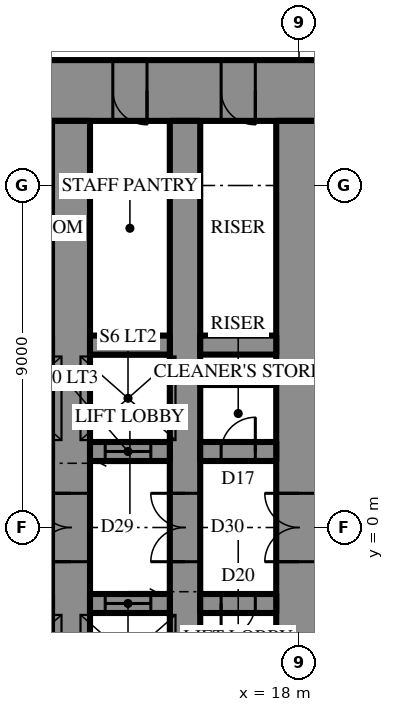
"""IFC4 building model, lengths in metres.
Left out: names, types, materials, properties, quantities, classifications, styles, units other than length and angle.
Written with IfcOpenShell. Run it as: python <this file> out.ifc"""

import sys

from ifc_helpers import new_model, si_unit, direction, frame, frame_2d, origin, place, context, subcontext, project, spatial, rectangle, extrude, element, fill, save


model = new_model("IFC4")
c1 = context("Model", 3, precision=1e-05, world=origin(), true_north=direction((0.0, 1.0)))
c2 = subcontext(c1, "Body", "Model", "MODEL_VIEW")
j1 = project(units=[si_unit("LENGTHUNIT", "METRE"), si_unit("PLANEANGLEUNIT", "RADIAN")], contexts=[c1])
p1 = place(None, origin())
s1 = spatial("IfcSite", under=j1, at=p1, CompositionType="ELEMENT")
p2 = place(p1, origin())
s2 = spatial("IfcBuilding", under=s1, at=p2, CompositionType="ELEMENT")
p3 = place(p2, frame((0.0, 0.0, 210.5)))
s3 = spatial("IfcBuildingStorey", under=s2, at=p3, CompositionType="ELEMENT", Elevation=210.5)
p4 = place(p3, frame((-18.6, 11.5, 0.0), z_axis=(0.0, 0.0, 1.0), x_axis=(1.0, 0.0, 0.0)))
e1 = element("IfcWall", 1, at=p4, inside=s3, PredefinedType="SHEAR", context=c2, shape_type="SweptSolid", body=[
    extrude(rectangle(XDim=37.2, YDim=1.6, at=frame_2d((18.6, 0.0))), origin(), (0.0, 0.0, 1.0), 5.0),
])
p5 = place(p4, frame((19.45, 0.0, 0.0)))
e2 = element("IfcOpeningElement", 2, at=p5, cuts=e1, PredefinedType="OPENING", context=c2, shape_type="SweptSolid", body=[
    extrude(rectangle(XDim=0.9, YDim=2.2, at=frame_2d((0.45, 1.1))), frame((0.0, 0.81, 0.0), z_axis=(0.0, -1.0, 0.0), x_axis=(1.0, 0.0, 0.0)), (0.0, 0.0, 1.0), 1.62),
])
p6 = place(p4, frame((22.45, 0.0, 0.0)))
e3 = element("IfcOpeningElement", 3, at=p6, cuts=e1, PredefinedType="OPENING", context=c2, shape_type="SweptSolid", body=[
    extrude(rectangle(XDim=0.9, YDim=2.2, at=frame_2d((0.45, 1.1))), frame((0.0, 0.81, 0.0), z_axis=(0.0, -1.0, 0.0), x_axis=(1.0, 0.0, 0.0)), (0.0, 0.0, 1.0), 1.62),
])
p7 = place(p4, frame((25.5, 0.0, 0.0)))
e4 = element("IfcOpeningElement", 4, at=p7, cuts=e1, PredefinedType="OPENING", context=c2, shape_type="SweptSolid", body=[
    extrude(rectangle(XDim=1.0, YDim=2.2, at=frame_2d((0.5, 1.1))), frame((0.0, 0.81, 0.0), z_axis=(0.0, -1.0, 0.0), x_axis=(1.0, 0.0, 0.0)), (0.0, 0.0, 1.0), 1.62),
])
p8 = place(p4, frame((1.75, 0.0, 0.0)))
e5 = element("IfcOpeningElement", 5, at=p8, cuts=e1, PredefinedType="OPENING", context=c2, shape_type="SweptSolid", body=[
    extrude(rectangle(XDim=0.9, YDim=2.2, at=frame_2d((0.45, 1.1))), frame((0.0, 0.81, 0.0), z_axis=(0.0, -1.0, 0.0), x_axis=(1.0, 0.0, 0.0)), (0.0, 0.0, 1.0), 1.62),
])
p9 = place(p4, frame((4.6, 0.0, 0.0)))
e6 = element("IfcOpeningElement", 6, at=p9, cuts=e1, PredefinedType="OPENING", context=c2, shape_type="SweptSolid", body=[
    extrude(rectangle(XDim=0.9, YDim=2.2, at=frame_2d((0.45, 1.1))), frame((0.0, 0.81, 0.0), z_axis=(0.0, -1.0, 0.0), x_axis=(1.0, 0.0, 0.0)), (0.0, 0.0, 1.0), 1.62),
])
p10 = place(p4, frame((7.85, 0.0, 0.0)))
e7 = element("IfcOpeningElement", 7, at=p10, cuts=e1, PredefinedType="OPENING", context=c2, shape_type="SweptSolid", body=[
    extrude(rectangle(XDim=0.9, YDim=2.2, at=frame_2d((0.45, 1.1))), frame((0.0, 0.81, 0.0), z_axis=(0.0, -1.0, 0.0), x_axis=(1.0, 0.0, 0.0)), (0.0, 0.0, 1.0), 1.62),
])
p11 = place(p4, frame((28.45, 0.0, 0.0)))
e8 = element("IfcOpeningElement", 8, at=p11, cuts=e1, PredefinedType="OPENING", context=c2, shape_type="SweptSolid", body=[
    extrude(rectangle(XDim=0.9, YDim=2.2, at=frame_2d((0.45, 1.1))), frame((0.0, 0.81, 0.0), z_axis=(0.0, -1.0, 0.0), x_axis=(1.0, 0.0, 0.0)), (0.0, 0.0, 1.0), 1.62),
])
p12 = place(p4, frame((31.7, 0.0, 0.0)))
e9 = element("IfcOpeningElement", 9, at=p12, cuts=e1, PredefinedType="OPENING", context=c2, shape_type="SweptSolid", body=[
    extrude(rectangle(XDim=0.9, YDim=2.2, at=frame_2d((0.45, 1.1))), frame((0.0, 0.81, 0.0), z_axis=(0.0, -1.0, 0.0), x_axis=(1.0, 0.0, 0.0)), (0.0, 0.0, 1.0), 1.62),
])
p13 = place(p4, frame((34.55, 0.0, 0.0)))
e10 = element("IfcOpeningElement", 10, at=p13, cuts=e1, PredefinedType="OPENING", context=c2, shape_type="SweptSolid", body=[
    extrude(rectangle(XDim=0.9, YDim=2.2, at=frame_2d((0.45, 1.1))), frame((0.0, 0.81, 0.0), z_axis=(0.0, -1.0, 0.0), x_axis=(1.0, 0.0, 0.0)), (0.0, 0.0, 1.0), 1.62),
])
p14 = place(p3, frame((18.0, -10.7, 0.0), z_axis=(0.0, 0.0, 1.0), x_axis=(0.0, 1.0, 0.0)))
e11 = element("IfcWall", 11, at=p14, inside=s3, PredefinedType="SHEAR", context=c2, shape_type="SweptSolid", body=[
    extrude(rectangle(XDim=21.4, YDim=1.2, at=frame_2d((10.7, 0.0))), origin(), (0.0, 0.0, 1.0), 5.0),
])
p15 = place(p14, frame((9.8, 0.0, 0.0)))
e12 = element("IfcOpeningElement", 12, at=p15, cuts=e11, PredefinedType="OPENING", context=c2, shape_type="SweptSolid", body=[
    extrude(rectangle(XDim=1.8, YDim=2.4, at=frame_2d((0.9, 1.2))), frame((0.0, 0.61, 0.0), z_axis=(0.0, -1.0, 0.0), x_axis=(1.0, 0.0, 0.0)), (0.0, 0.0, 1.0), 1.22),
])
p16 = place(p3, frame((12.0, -10.7, 0.0), z_axis=(0.0, 0.0, 1.0), x_axis=(0.0, 1.0, 0.0)))
e13 = element("IfcWall", 13, at=p16, inside=s3, PredefinedType="SHEAR", context=c2, shape_type="SweptSolid", body=[
    extrude(rectangle(XDim=21.4, YDim=1.0, at=frame_2d((10.7, 0.0))), origin(), (0.0, 0.0, 1.0), 5.0),
])
p17 = place(p16, frame((9.8, 0.0, 0.0)))
e14 = element("IfcOpeningElement", 14, at=p17, cuts=e13, PredefinedType="OPENING", context=c2, shape_type="SweptSolid", body=[
    extrude(rectangle(XDim=1.8, YDim=2.4, at=frame_2d((0.9, 1.2))), frame((0.0, 0.51, 0.0), z_axis=(0.0, -1.0, 0.0), x_axis=(1.0, 0.0, 0.0)), (0.0, 0.0, 1.0), 1.02),
])
p18 = place(p3, frame((15.0, -10.7, 0.0), z_axis=(0.0, 0.0, 1.0), x_axis=(0.0, 1.0, 0.0)))
e15 = element("IfcWall", 15, at=p18, inside=s3, PredefinedType="SHEAR", context=c2, shape_type="SweptSolid", body=[
    extrude(rectangle(XDim=21.4, YDim=0.8, at=frame_2d((10.7, 0.0))), origin(), (0.0, 0.0, 1.0), 5.0),
])
p19 = place(p18, frame((9.8, 0.0, 0.0)))
e16 = element("IfcOpeningElement", 16, at=p19, cuts=e15, PredefinedType="OPENING", context=c2, shape_type="SweptSolid", body=[
    extrude(rectangle(XDim=1.8, YDim=2.4, at=frame_2d((0.9, 1.2))), frame((0.0, 0.41, 0.0), z_axis=(0.0, -1.0, 0.0), x_axis=(1.0, 0.0, 0.0)), (0.0, 0.0, 1.0), 0.82),
])
p20 = place(p3, frame((-3.2, 2.0, 0.0), z_axis=(0.0, 0.0, 1.0), x_axis=(1.0, 0.0, 0.0)))
e17 = element("IfcWall", 17, at=p20, inside=s3, PredefinedType="SHEAR", context=c2, shape_type="SweptSolid", body=[
    extrude(rectangle(XDim=14.7, YDim=0.5, at=frame_2d((7.35, 0.0))), origin(), (0.0, 0.0, 1.0), 5.0),
])
p21 = place(p20, frame((1.15, 0.0, 0.0)))
e18 = element("IfcOpeningElement", 18, at=p21, cuts=e17, PredefinedType="OPENING", context=c2, shape_type="SweptSolid", body=[
    extrude(rectangle(XDim=1.1, YDim=2.2, at=frame_2d((0.55, 1.1))), frame((0.0, 0.26, 0.0), z_axis=(0.0, -1.0, 0.0), x_axis=(1.0, 0.0, 0.0)), (0.0, 0.0, 1.0), 0.52),
])
p22 = place(p20, frame((4.15, 0.0, 0.0)))
e19 = element("IfcOpeningElement", 19, at=p22, cuts=e17, PredefinedType="OPENING", context=c2, shape_type="SweptSolid", body=[
    extrude(rectangle(XDim=1.1, YDim=2.2, at=frame_2d((0.55, 1.1))), frame((0.0, 0.26, 0.0), z_axis=(0.0, -1.0, 0.0), x_axis=(1.0, 0.0, 0.0)), (0.0, 0.0, 1.0), 0.52),
])
p23 = place(p20, frame((7.15, 0.0, 0.0)))
e20 = element("IfcOpeningElement", 20, at=p23, cuts=e17, PredefinedType="OPENING", context=c2, shape_type="SweptSolid", body=[
    extrude(rectangle(XDim=1.1, YDim=2.2, at=frame_2d((0.55, 1.1))), frame((0.0, 0.26, 0.0), z_axis=(0.0, -1.0, 0.0), x_axis=(1.0, 0.0, 0.0)), (0.0, 0.0, 1.0), 0.52),
])
p24 = place(p20, frame((10.15, 0.0, 0.0)))
e21 = element("IfcOpeningElement", 21, at=p24, cuts=e17, PredefinedType="OPENING", context=c2, shape_type="SweptSolid", body=[
    extrude(rectangle(XDim=1.1, YDim=2.2, at=frame_2d((0.55, 1.1))), frame((0.0, 0.26, 0.0), z_axis=(0.0, -1.0, 0.0), x_axis=(1.0, 0.0, 0.0)), (0.0, 0.0, 1.0), 0.52),
])
p25 = place(p3, frame((12.5, 2.0, 0.0), z_axis=(0.0, 0.0, 1.0), x_axis=(1.0, 0.0, 0.0)))
e22 = element("IfcWall", 22, at=p25, inside=s3, PredefinedType="SHEAR", context=c2, shape_type="SweptSolid", body=[
    extrude(rectangle(XDim=2.1, YDim=0.5, at=frame_2d((1.05, 0.0))), origin(), (0.0, 0.0, 1.0), 5.0),
])
p26 = place(p25, frame((0.4, 0.0, 0.0)))
e23 = element("IfcOpeningElement", 23, at=p26, cuts=e22, PredefinedType="OPENING", context=c2, shape_type="SweptSolid", body=[
    extrude(rectangle(XDim=1.2, YDim=2.2, at=frame_2d((0.6, 1.1))), frame((0.0, 0.26, 0.0), z_axis=(0.0, -1.0, 0.0), x_axis=(1.0, 0.0, 0.0)), (0.0, 0.0, 1.0), 0.52),
])
p27 = place(p3, frame((15.4, 2.0, 0.0), z_axis=(0.0, 0.0, 1.0), x_axis=(1.0, 0.0, 0.0)))
e24 = element("IfcWall", 24, at=p27, inside=s3, PredefinedType="SHEAR", context=c2, shape_type="SweptSolid", body=[
    extrude(rectangle(XDim=2.0, YDim=0.5, at=frame_2d((1.0, 0.0))), origin(), (0.0, 0.0, 1.0), 5.0),
])
p28 = place(p27, frame((0.55, 0.0, 0.0)))
e25 = element("IfcOpeningElement", 25, at=p28, cuts=e24, PredefinedType="OPENING", context=c2, shape_type="SweptSolid", body=[
    extrude(rectangle(XDim=0.9, YDim=2.2, at=frame_2d((0.45, 1.1))), frame((0.0, 0.26, 0.0), z_axis=(0.0, -1.0, 0.0), x_axis=(1.0, 0.0, 0.0)), (0.0, 0.0, 1.0), 0.52),
])
p29 = place(p3, frame((12.5, 4.8, 0.0), z_axis=(0.0, 0.0, 1.0), x_axis=(1.0, 0.0, 0.0)))
e26 = element("IfcWall", 26, at=p29, inside=s3, PredefinedType="SHEAR", context=c2, shape_type="SweptSolid", body=[
    extrude(rectangle(XDim=2.1, YDim=0.5, at=frame_2d((1.05, 0.0))), origin(), (0.0, 0.0, 1.0), 5.0),
])
p30 = place(p3, frame((15.4, 4.8, 0.0), z_axis=(0.0, 0.0, 1.0), x_axis=(1.0, 0.0, 0.0)))
e27 = element("IfcWall", 27, at=p30, inside=s3, PredefinedType="SHEAR", context=c2, shape_type="SweptSolid", body=[
    extrude(rectangle(XDim=2.0, YDim=0.5, at=frame_2d((1.0, 0.0))), origin(), (0.0, 0.0, 1.0), 5.0),
])
p31 = place(p3, frame((17.4, -2.0, 0.0), z_axis=(0.0, 0.0, 1.0), x_axis=(-1.0, 0.0, 0.0)))
e28 = element("IfcWall", 28, at=p31, inside=s3, PredefinedType="SHEAR", context=c2, shape_type="SweptSolid", body=[
    extrude(rectangle(XDim=2.0, YDim=0.5, at=frame_2d((1.0, 0.0))), origin(), (0.0, 0.0, 1.0), 5.0),
])
p32 = place(p31, frame((0.55, 0.0, 0.0)))
e29 = element("IfcOpeningElement", 29, at=p32, cuts=e28, PredefinedType="OPENING", context=c2, shape_type="SweptSolid", body=[
    extrude(rectangle(XDim=0.9, YDim=2.2, at=frame_2d((0.45, 1.1))), frame((0.0, 0.26, 0.0), z_axis=(0.0, -1.0, 0.0), x_axis=(1.0, 0.0, 0.0)), (0.0, 0.0, 1.0), 0.52),
])
p33 = place(p3, frame((14.6, -2.0, 0.0), z_axis=(0.0, 0.0, 1.0), x_axis=(-1.0, 0.0, 0.0)))
e30 = element("IfcWall", 30, at=p33, inside=s3, PredefinedType="SHEAR", context=c2, shape_type="SweptSolid", body=[
    extrude(rectangle(XDim=2.1, YDim=0.5, at=frame_2d((1.05, 0.0))), origin(), (0.0, 0.0, 1.0), 5.0),
])
p34 = place(p33, frame((0.5, 0.0, 0.0)))
e31 = element("IfcOpeningElement", 31, at=p34, cuts=e30, PredefinedType="OPENING", context=c2, shape_type="SweptSolid", body=[
    extrude(rectangle(XDim=1.2, YDim=2.2, at=frame_2d((0.6, 1.1))), frame((0.0, 0.26, 0.0), z_axis=(0.0, -1.0, 0.0), x_axis=(1.0, 0.0, 0.0)), (0.0, 0.0, 1.0), 0.52),
])
p35 = place(p3, frame((18.057, -26.425, 0.0), z_axis=(0.0, 0.0, 1.0), x_axis=(0.500001051461, 0.866024796723, 0.0)))
e32 = element("IfcWall", 32, at=p35, inside=s3, PredefinedType="SOLIDWALL", context=c2, shape_type="SweptSolid", body=[
    extrude(rectangle(XDim=27.713, YDim=0.3, at=frame_2d((13.856, 0.0))), origin(), (0.0, 0.0, 1.0), 2.8),
])
p36 = place(p35, frame((1.309, 0.0, 0.6)))
e33 = element("IfcOpeningElement", 33, at=p36, cuts=e32, PredefinedType="OPENING", context=c2, shape_type="SweptSolid", body=[
    extrude(rectangle(XDim=2.0, YDim=1.95, at=frame_2d((1.0, 0.975))), frame((0.0, 0.16, 0.0), z_axis=(0.0, -1.0, 0.0), x_axis=(1.0, 0.0, 0.0)), (0.0, 0.0, 1.0), 0.32),
])
p37 = place(p35, frame((5.928, 0.0, 0.6)))
e34 = element("IfcOpeningElement", 34, at=p37, cuts=e32, PredefinedType="OPENING", context=c2, shape_type="SweptSolid", body=[
    extrude(rectangle(XDim=2.0, YDim=1.95, at=frame_2d((1.0, 0.975))), frame((0.0, 0.16, 0.0), z_axis=(0.0, -1.0, 0.0), x_axis=(1.0, 0.0, 0.0)), (0.0, 0.0, 1.0), 0.32),
])
p38 = place(p35, frame((10.947, 0.0, 0.0)))
e35 = element("IfcOpeningElement", 35, at=p38, cuts=e32, PredefinedType="OPENING", context=c2, shape_type="SweptSolid", body=[
    extrude(rectangle(XDim=1.2, YDim=2.4, at=frame_2d((0.6, 1.2))), frame((0.0, 0.16, 0.0), z_axis=(0.0, -1.0, 0.0), x_axis=(1.0, 0.0, 0.0)), (0.0, 0.0, 1.0), 0.32),
])
p39 = place(p35, frame((15.166, 0.0, 0.6)))
e36 = element("IfcOpeningElement", 36, at=p39, cuts=e32, PredefinedType="OPENING", context=c2, shape_type="SweptSolid", body=[
    extrude(rectangle(XDim=2.0, YDim=1.95, at=frame_2d((1.0, 0.975))), frame((0.0, 0.16, 0.0), z_axis=(0.0, -1.0, 0.0), x_axis=(1.0, 0.0, 0.0)), (0.0, 0.0, 1.0), 0.32),
])
p40 = place(p35, frame((19.785, 0.0, 0.6)))
e37 = element("IfcOpeningElement", 37, at=p40, cuts=e32, PredefinedType="OPENING", context=c2, shape_type="SweptSolid", body=[
    extrude(rectangle(XDim=2.0, YDim=1.95, at=frame_2d((1.0, 0.975))), frame((0.0, 0.16, 0.0), z_axis=(0.0, -1.0, 0.0), x_axis=(1.0, 0.0, 0.0)), (0.0, 0.0, 1.0), 0.32),
])
p41 = place(p35, frame((24.403, 0.0, 0.6)))
e38 = element("IfcOpeningElement", 38, at=p41, cuts=e32, PredefinedType="OPENING", context=c2, shape_type="SweptSolid", body=[
    extrude(rectangle(XDim=2.0, YDim=1.95, at=frame_2d((1.0, 0.975))), frame((0.0, 0.16, 0.0), z_axis=(0.0, -1.0, 0.0), x_axis=(1.0, 0.0, 0.0)), (0.0, 0.0, 1.0), 0.32),
])
p42 = place(p3, frame((15.4, 3.85, 0.0), z_axis=(0.0, 0.0, 1.0), x_axis=(1.0, 0.0, 0.0)))
e39 = element("IfcWall", 39, at=p42, inside=s3, PredefinedType="PARTITIONING", context=c2, shape_type="SweptSolid", body=[
    extrude(rectangle(XDim=2.0, YDim=0.2, at=frame_2d((1.0, 0.0))), origin(), (0.0, 0.0, 1.0), 4.8),
])
p43 = place(p15, origin())
e40 = element("IfcDoor", 40, at=p43, inside=s3, OperationType="DOUBLE_DOOR_SINGLE_SWING", PredefinedType="DOOR", context=c2, shape_type="SweptSolid", body=[
    extrude(rectangle(XDim=1.8, YDim=2.4, at=frame_2d((0.9, 1.2))), frame((0.0, 0.025, 0.0), z_axis=(0.0, -1.0, 0.0), x_axis=(1.0, 0.0, 0.0)), (0.0, 0.0, 1.0), 0.05),
])
fill(e12, e40)
p44 = place(p12, frame((0.9, 0.0, 0.0), z_axis=(0.0, 0.0, 1.0), x_axis=(-1.0, 0.0, 0.0)))
e41 = element("IfcDoor", 41, at=p44, inside=s3, OperationType="SINGLE_SWING_RIGHT", PredefinedType="DOOR", context=c2, shape_type="SweptSolid", body=[
    extrude(rectangle(XDim=0.9, YDim=2.2, at=frame_2d((0.45, 1.1))), frame((0.0, 0.025, 0.0), z_axis=(0.0, -1.0, 0.0), x_axis=(1.0, 0.0, 0.0)), (0.0, 0.0, 1.0), 0.05),
])
fill(e9, e41)
p45 = place(p13, frame((0.9, 0.0, 0.0), z_axis=(0.0, 0.0, 1.0), x_axis=(-1.0, 0.0, 0.0)))
e42 = element("IfcDoor", 42, at=p45, inside=s3, OperationType="SINGLE_SWING_RIGHT", PredefinedType="DOOR", context=c2, shape_type="SweptSolid", body=[
    extrude(rectangle(XDim=0.9, YDim=2.2, at=frame_2d((0.45, 1.1))), frame((0.0, 0.025, 0.0), z_axis=(0.0, -1.0, 0.0), x_axis=(1.0, 0.0, 0.0)), (0.0, 0.0, 1.0), 0.05),
])
fill(e10, e42)
p46 = place(p28, origin())
e43 = element("IfcDoor", 43, at=p46, inside=s3, OperationType="SINGLE_SWING_LEFT", PredefinedType="DOOR", context=c2, shape_type="SweptSolid", body=[
    extrude(rectangle(XDim=0.9, YDim=2.2, at=frame_2d((0.45, 1.1))), frame((0.0, 0.025, 0.0), z_axis=(0.0, -1.0, 0.0), x_axis=(1.0, 0.0, 0.0)), (0.0, 0.0, 1.0), 0.05),
])
fill(e25, e43)
p47 = place(p32, origin())
e44 = element("IfcDoor", 44, at=p47, inside=s3, OperationType="SINGLE_SWING_LEFT", PredefinedType="DOOR", context=c2, shape_type="SweptSolid", body=[
    extrude(rectangle(XDim=0.9, YDim=2.2, at=frame_2d((0.45, 1.1))), frame((0.0, 0.025, 0.0), z_axis=(0.0, -1.0, 0.0), x_axis=(1.0, 0.0, 0.0)), (0.0, 0.0, 1.0), 0.05),
])
fill(e29, e44)
p48 = place(p17, origin())
e45 = element("IfcDoor", 45, at=p48, inside=s3, OperationType="DOUBLE_DOOR_SINGLE_SWING", PredefinedType="DOOR", context=c2, shape_type="SweptSolid", body=[
    extrude(rectangle(XDim=1.8, YDim=2.4, at=frame_2d((0.9, 1.2))), frame((0.0, 0.025, 0.0), z_axis=(0.0, -1.0, 0.0), x_axis=(1.0, 0.0, 0.0)), (0.0, 0.0, 1.0), 0.05),
])
fill(e14, e45)
p49 = place(p19, origin())
e46 = element("IfcDoor", 46, at=p49, inside=s3, OperationType="DOUBLE_DOOR_SINGLE_SWING", PredefinedType="DOOR", context=c2, shape_type="SweptSolid", body=[
    extrude(rectangle(XDim=1.8, YDim=2.4, at=frame_2d((0.9, 1.2))), frame((0.0, 0.025, 0.0), z_axis=(0.0, -1.0, 0.0), x_axis=(1.0, 0.0, 0.0)), (0.0, 0.0, 1.0), 0.05),
])
fill(e16, e46)
p50 = place(p26, frame((1.2, 0.0, 0.0), z_axis=(0.0, 0.0, 1.0), x_axis=(-1.0, 0.0, 0.0)))
e47 = element("IfcDoor", 47, at=p50, inside=s3, OperationType="SLIDING_TO_LEFT", PredefinedType="DOOR", context=c2, shape_type="SweptSolid", body=[
    extrude(rectangle(XDim=1.2, YDim=2.2, at=frame_2d((0.6, 1.1))), frame((0.0, 0.025, 0.0), z_axis=(0.0, -1.0, 0.0), x_axis=(1.0, 0.0, 0.0)), (0.0, 0.0, 1.0), 0.05),
])
fill(e23, e47)
p51 = place(p34, frame((1.2, 0.0, 0.0), z_axis=(0.0, 0.0, 1.0), x_axis=(-1.0, 0.0, 0.0)))
e48 = element("IfcDoor", 48, at=p51, inside=s3, OperationType="SLIDING_TO_LEFT", PredefinedType="DOOR", context=c2, shape_type="SweptSolid", body=[
    extrude(rectangle(XDim=1.2, YDim=2.2, at=frame_2d((0.6, 1.1))), frame((0.0, 0.025, 0.0), z_axis=(0.0, -1.0, 0.0), x_axis=(1.0, 0.0, 0.0)), (0.0, 0.0, 1.0), 0.05),
])
fill(e31, e48)
save(model, sys.argv[1])
